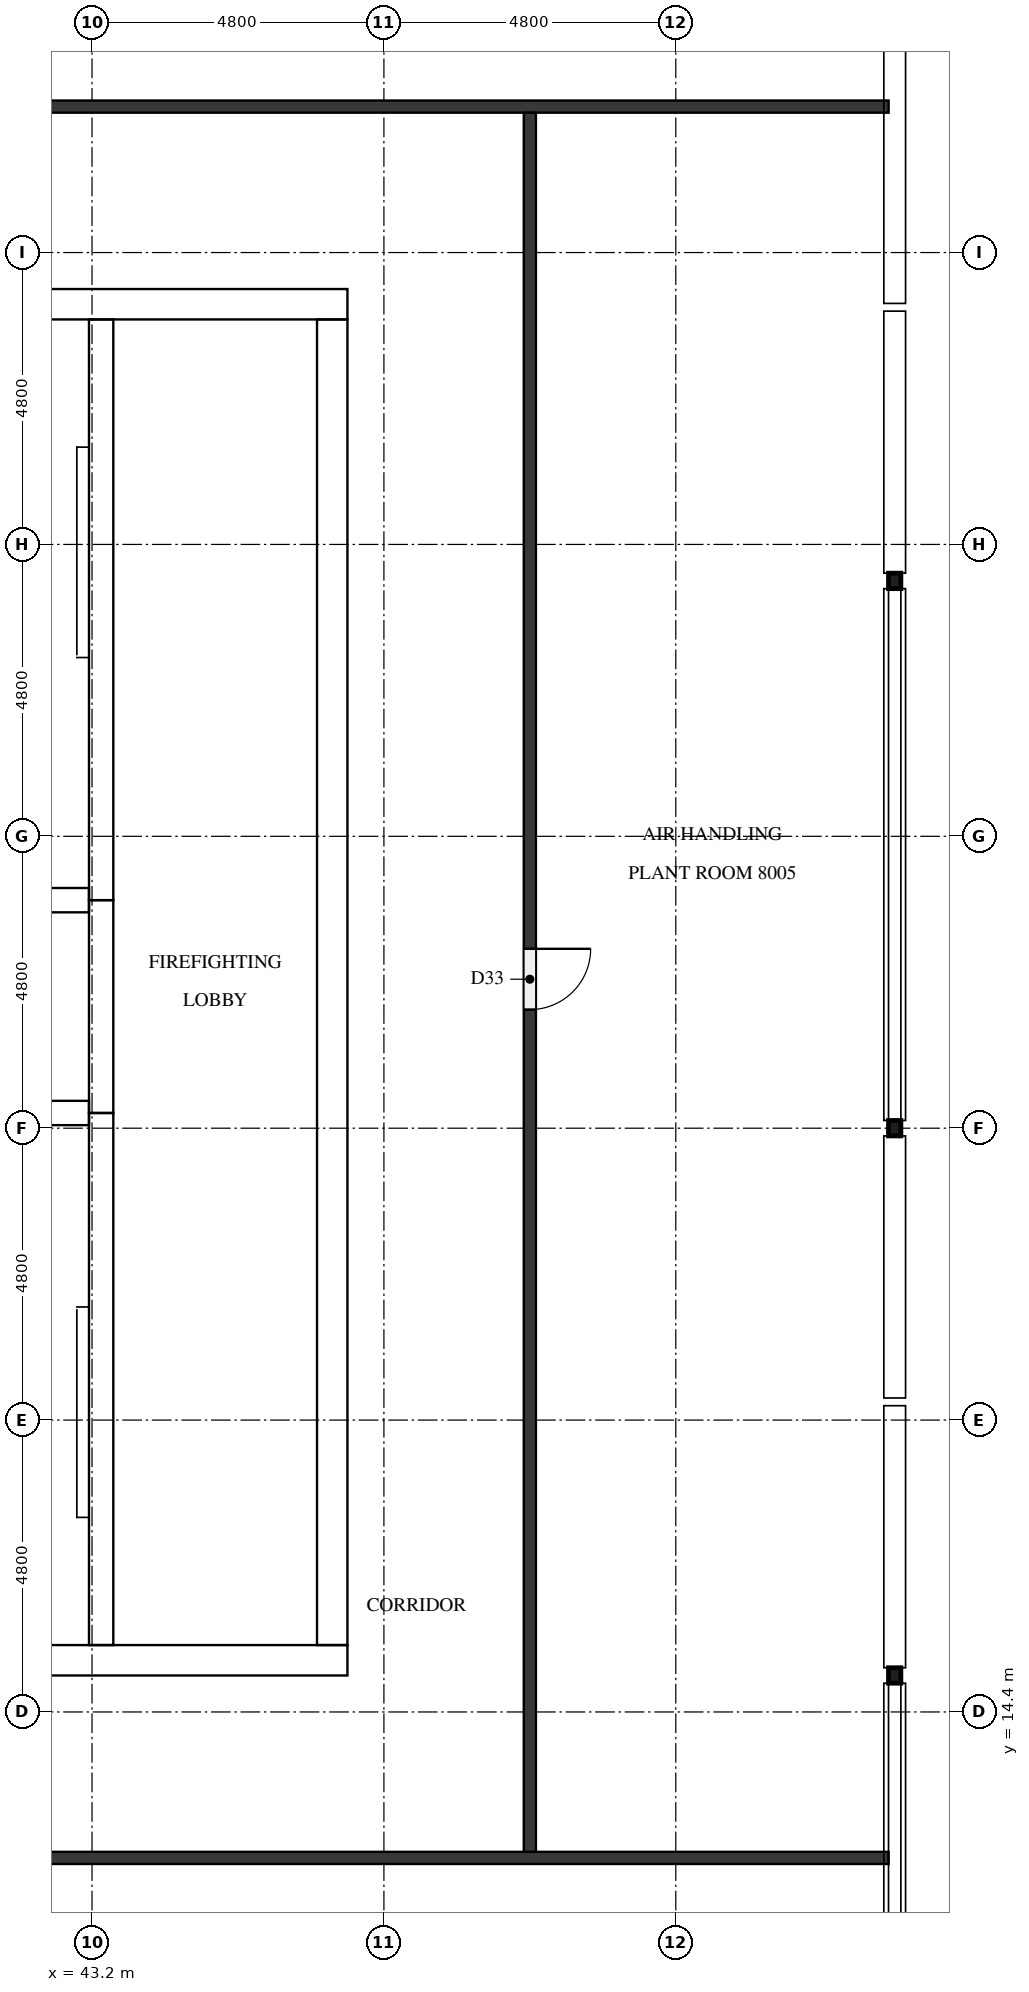
"""IFC4 building model, lengths in metres.
Left out: names, types, materials, properties, quantities, classifications, styles, units other than length and angle.
Written with IfcOpenShell. Run it as: python <this file> out.ifc"""

import sys

from ifc_helpers import new_model, si_unit, direction, frame, frame_2d, origin, origin_2d, place, context, subcontext, project, spatial, rectangle, hollow_rectangle, extrude, element, fill, save


model = new_model("IFC4")
c1 = context("Model", 3, precision=1e-05, world=origin(), true_north=direction((0.0, 1.0)))
c2 = subcontext(c1, "Body", "Model", "MODEL_VIEW")
j1 = project(units=[si_unit("LENGTHUNIT", "METRE"), si_unit("PLANEANGLEUNIT", "RADIAN")], contexts=[c1])
p1 = place(None, origin())
s1 = spatial("IfcSite", under=j1, at=p1, CompositionType="ELEMENT")
p2 = place(p1, origin())
s2 = spatial("IfcBuilding", under=s1, at=p2, CompositionType="ELEMENT")
p3 = place(p2, frame((0.0, 0.0, 310.1)))
s3 = spatial("IfcBuildingStorey", under=s2, at=p3, CompositionType="ELEMENT", Elevation=310.1)
p4 = place(p3, frame((15.0, 15.25, 0.0), z_axis=(0.0, 0.0, 1.0), x_axis=(1.0, 0.0, 0.0)))
e1 = element("IfcWall", 1, at=p4, inside=s3, PredefinedType="SHEAR", context=c2, shape_type="SweptSolid", body=[
    extrude(rectangle(XDim=32.4, YDim=0.5, at=frame_2d((16.2, 0.0))), origin(), (0.0, 0.0, 1.0), 3.8),
])
p5 = place(p4, frame((15.3, 0.0, 0.0)))
e2 = element("IfcOpeningElement", 2, at=p5, cuts=e1, PredefinedType="OPENING", context=c2, shape_type="SweptSolid", body=[
    extrude(rectangle(XDim=1.8, YDim=2.1, at=frame_2d((0.9, 1.05))), frame((0.0, 0.26, 0.0), z_axis=(0.0, -1.0, 0.0), x_axis=(1.0, 0.0, 0.0)), (0.0, 0.0, 1.0), 0.52),
])
p6 = place(p3, frame((15.0, 37.55, 0.0), z_axis=(0.0, 0.0, 1.0), x_axis=(1.0, 0.0, 0.0)))
e3 = element("IfcWall", 3, at=p6, inside=s3, PredefinedType="SHEAR", context=c2, shape_type="SweptSolid", body=[
    extrude(rectangle(XDim=32.4, YDim=0.5, at=frame_2d((16.2, 0.0))), origin(), (0.0, 0.0, 1.0), 3.8),
])
p7 = place(p6, frame((15.3, 0.0, 0.0)))
e4 = element("IfcOpeningElement", 4, at=p7, cuts=e3, PredefinedType="OPENING", context=c2, shape_type="SweptSolid", body=[
    extrude(rectangle(XDim=1.8, YDim=2.1, at=frame_2d((0.9, 1.05))), frame((0.0, 0.26, 0.0), z_axis=(0.0, -1.0, 0.0), x_axis=(1.0, 0.0, 0.0)), (0.0, 0.0, 1.0), 0.52),
])
p8 = place(p6, frame((1.282, 0.0, 0.0)))
e5 = element("IfcOpeningElement", 5, at=p8, cuts=e3, PredefinedType="OPENING", context=c2, shape_type="SweptSolid", body=[
    extrude(rectangle(XDim=1.0, YDim=2.1, at=frame_2d((0.5, 1.05))), frame((0.0, 0.26, 0.0), z_axis=(0.0, -1.0, 0.0), x_axis=(1.0, 0.0, 0.0)), (0.0, 0.0, 1.0), 0.52),
])
p9 = place(p6, frame((5.082, 0.0, 0.0)))
e6 = element("IfcOpeningElement", 6, at=p9, cuts=e3, PredefinedType="OPENING", context=c2, shape_type="SweptSolid", body=[
    extrude(rectangle(XDim=1.0, YDim=2.1, at=frame_2d((0.5, 1.05))), frame((0.0, 0.26, 0.0), z_axis=(0.0, -1.0, 0.0), x_axis=(1.0, 0.0, 0.0)), (0.0, 0.0, 1.0), 0.52),
])
p10 = place(p3, frame((47.15, 15.5, 0.0), z_axis=(0.0, 0.0, 1.0), x_axis=(0.0, 1.0, 0.0)))
e7 = element("IfcWall", 7, at=p10, inside=s3, PredefinedType="SHEAR", context=c2, shape_type="SweptSolid", body=[
    extrude(rectangle(XDim=21.8, YDim=0.5, at=frame_2d((10.9, 0.0))), origin(), (0.0, 0.0, 1.0), 3.8),
])
p11 = place(p10, frame((10.6, 0.0, 0.0)))
e8 = element("IfcOpeningElement", 8, at=p11, cuts=e7, PredefinedType="OPENING", context=c2, shape_type="SweptSolid", body=[
    extrude(rectangle(XDim=1.2, YDim=2.1, at=frame_2d((0.6, 1.05))), frame((0.0, 0.26, 0.0), z_axis=(0.0, -1.0, 0.0), x_axis=(1.0, 0.0, 0.0)), (0.0, 0.0, 1.0), 0.52),
])
p12 = place(p3, frame((43.35, 15.5, 0.0), z_axis=(0.0, 0.0, 1.0), x_axis=(0.0, 1.0, 0.0)))
e9 = element("IfcWall", 9, at=p12, inside=s3, PredefinedType="SHEAR", context=c2, shape_type="SweptSolid", body=[
    extrude(rectangle(XDim=8.75, YDim=0.4, at=frame_2d((4.375, 0.0))), origin(), (0.0, 0.0, 1.0), 3.8),
])
p13 = place(p12, frame((0.7, 0.0, 0.0)))
e10 = element("IfcOpeningElement", 10, at=p13, cuts=e9, PredefinedType="OPENING", context=c2, shape_type="SweptSolid", body=[
    extrude(rectangle(XDim=1.2, YDim=2.1, at=frame_2d((0.6, 1.05))), frame((0.0, 0.21, 0.0), z_axis=(0.0, -1.0, 0.0), x_axis=(1.0, 0.0, 0.0)), (0.0, 0.0, 1.0), 0.42),
])
p14 = place(p3, frame((43.35, 24.25, 0.0), z_axis=(0.0, 0.0, 1.0), x_axis=(0.0, 1.0, 0.0)))
e11 = element("IfcWall", 11, at=p14, inside=s3, PredefinedType="SHEAR", context=c2, shape_type="SweptSolid", body=[
    extrude(rectangle(XDim=3.5, YDim=0.4, at=frame_2d((1.75, 0.0))), origin(), (0.0, 0.0, 1.0), 3.8),
])
p15 = place(p14, frame((1.2, 0.0, 0.0)))
e12 = element("IfcOpeningElement", 12, at=p15, cuts=e11, PredefinedType="OPENING", context=c2, shape_type="SweptSolid", body=[
    extrude(rectangle(XDim=1.1, YDim=2.1, at=frame_2d((0.55, 1.05))), frame((0.0, 0.21, 0.0), z_axis=(0.0, -1.0, 0.0), x_axis=(1.0, 0.0, 0.0)), (0.0, 0.0, 1.0), 0.42),
])
p16 = place(p3, frame((43.35, 27.75, 0.0), z_axis=(0.0, 0.0, 1.0), x_axis=(0.0, 1.0, 0.0)))
e13 = element("IfcWall", 13, at=p16, inside=s3, PredefinedType="SHEAR", context=c2, shape_type="SweptSolid", body=[
    extrude(rectangle(XDim=9.55, YDim=0.4, at=frame_2d((4.775, 0.0))), origin(), (0.0, 0.0, 1.0), 3.8),
])
p17 = place(p16, frame((7.65, 0.0, 0.0)))
e14 = element("IfcOpeningElement", 14, at=p17, cuts=e13, PredefinedType="OPENING", context=c2, shape_type="SweptSolid", body=[
    extrude(rectangle(XDim=1.2, YDim=2.1, at=frame_2d((0.6, 1.05))), frame((0.0, 0.21, 0.0), z_axis=(0.0, -1.0, 0.0), x_axis=(1.0, 0.0, 0.0)), (0.0, 0.0, 1.0), 0.42),
])
for number, where, z_axis, x_axis in (
    (15, (39.5, 24.25, 0.0), (0.0, 0.0, 1.0), (1.0, 0.0, 0.0)),
    (16, (39.5, 27.75, 0.0), (0.0, 0.0, 1.0), (1.0, 0.0, 0.0)),
):
    element("IfcWall", number, at=place(p3, frame(where, z_axis=z_axis, x_axis=x_axis)), inside=s3, PredefinedType="SHEAR", context=c2, shape_type="SweptSolid", body=[
        extrude(rectangle(XDim=3.65, YDim=0.4, at=frame_2d((1.825, 0.0))), origin(), (0.0, 0.0, 1.0), 3.8),
    ])
for number, where, z_axis, x_axis in (
    (17, (56.4, 15.0, 0.0), (0.0, 0.0, 1.0), (1.0, 0.0, 0.0)),
    (18, (56.4, 24.0, 0.0), (0.0, 0.0, 1.0), (1.0, 0.0, 0.0)),
    (19, (56.4, 33.0, 0.0), (0.0, 0.0, 1.0), (1.0, 0.0, 0.0)),
):
    element("IfcColumn", number, at=place(p3, frame(where, z_axis=z_axis, x_axis=x_axis)), inside=s3, PredefinedType="COLUMN", context=c2, shape_type="SweptSolid", body=[
        extrude(hollow_rectangle(XDim=0.203, YDim=0.254, WallThickness=0.01, InnerFilletRadius=0.004, OuterFilletRadius=0.013, at=origin_2d()), origin(), (0.0, 0.0, 1.0), 3.8),
    ])
p18 = place(p3, frame((56.3, 12.0, 0.0), z_axis=(0.0, 0.0, 1.0), x_axis=(-1.0, 0.0, 0.0)))
e20 = element("IfcWall", 20, at=p18, inside=s3, PredefinedType="PARTITIONING", context=c2, shape_type="SweptSolid", body=[
    extrude(rectangle(XDim=55.0, YDim=0.2, at=frame_2d((27.5, 0.0))), origin(), (0.0, 0.0, 1.0), 3.8),
])
p19 = place(p18, frame((35.35, 0.0, 0.0)))
e21 = element("IfcOpeningElement", 21, at=p19, cuts=e20, PredefinedType="OPENING", context=c2, shape_type="SweptSolid", body=[
    extrude(rectangle(XDim=1.0, YDim=2.1, at=frame_2d((0.5, 1.05))), frame((0.0, 0.11, 0.0), z_axis=(0.0, -1.0, 0.0), x_axis=(1.0, 0.0, 0.0)), (0.0, 0.0, 1.0), 0.22),
])
p20 = place(p18, frame((16.15, 0.0, 0.0)))
e22 = element("IfcOpeningElement", 22, at=p20, cuts=e20, PredefinedType="OPENING", context=c2, shape_type="SweptSolid", body=[
    extrude(rectangle(XDim=1.0, YDim=2.1, at=frame_2d((0.5, 1.05))), frame((0.0, 0.11, 0.0), z_axis=(0.0, -1.0, 0.0), x_axis=(1.0, 0.0, 0.0)), (0.0, 0.0, 1.0), 0.22),
])
p21 = place(p3, frame((1.3, 40.8, 0.0), z_axis=(0.0, 0.0, 1.0), x_axis=(1.0, 0.0, 0.0)))
e23 = element("IfcWall", 23, at=p21, inside=s3, PredefinedType="PARTITIONING", context=c2, shape_type="SweptSolid", body=[
    extrude(rectangle(XDim=55.0, YDim=0.2, at=frame_2d((27.5, 0.0))), origin(), (0.0, 0.0, 1.0), 3.8),
])
p22 = place(p21, frame((29.35, 0.0, 0.0)))
e24 = element("IfcOpeningElement", 24, at=p22, cuts=e23, PredefinedType="OPENING", context=c2, shape_type="SweptSolid", body=[
    extrude(rectangle(XDim=1.0, YDim=2.1, at=frame_2d((0.5, 1.05))), frame((0.0, 0.11, 0.0), z_axis=(0.0, -1.0, 0.0), x_axis=(1.0, 0.0, 0.0)), (0.0, 0.0, 1.0), 0.22),
])
p23 = place(p3, frame((50.4, 40.7, 0.0), z_axis=(0.0, 0.0, 1.0), x_axis=(0.0, -1.0, 0.0)))
e25 = element("IfcWall", 25, at=p23, inside=s3, PredefinedType="PARTITIONING", context=c2, shape_type="SweptSolid", body=[
    extrude(rectangle(XDim=28.6, YDim=0.2, at=frame_2d((14.3, 0.0))), origin(), (0.0, 0.0, 1.0), 3.8),
])
p24 = place(p23, frame((13.75, 0.0, 0.0)))
e26 = element("IfcOpeningElement", 26, at=p24, cuts=e25, PredefinedType="OPENING", context=c2, shape_type="SweptSolid", body=[
    extrude(rectangle(XDim=1.0, YDim=2.1, at=frame_2d((0.5, 1.05))), frame((0.0, 0.11, 0.0), z_axis=(0.0, -1.0, 0.0), x_axis=(1.0, 0.0, 0.0)), (0.0, 0.0, 1.0), 0.22),
])
p25 = place(p15, origin())
e27 = element("IfcDoor", 27, at=p25, inside=s3, OperationType="DOUBLE_DOOR_SLIDING", PredefinedType="DOOR", context=c2, shape_type="SweptSolid", body=[
    extrude(rectangle(XDim=1.1, YDim=2.1, at=frame_2d((0.55, 1.05))), frame((0.0, 0.025, 0.0), z_axis=(0.0, -1.0, 0.0), x_axis=(1.0, 0.0, 0.0)), (0.0, 0.0, 1.0), 0.05),
])
fill(e12, e27)
p26 = place(p13, origin())
e28 = element("IfcDoor", 28, at=p26, inside=s3, OperationType="SINGLE_SWING_LEFT", PredefinedType="DOOR", context=c2, shape_type="SweptSolid", body=[
    extrude(rectangle(XDim=1.2, YDim=2.1, at=frame_2d((0.6, 1.05))), frame((0.0, 0.025, 0.0), z_axis=(0.0, -1.0, 0.0), x_axis=(1.0, 0.0, 0.0)), (0.0, 0.0, 1.0), 0.05),
])
fill(e10, e28)
p27 = place(p17, origin())
e29 = element("IfcDoor", 29, at=p27, inside=s3, OperationType="SINGLE_SWING_RIGHT", PredefinedType="DOOR", context=c2, shape_type="SweptSolid", body=[
    extrude(rectangle(XDim=1.2, YDim=2.1, at=frame_2d((0.6, 1.05))), frame((0.0, 0.025, 0.0), z_axis=(0.0, -1.0, 0.0), x_axis=(1.0, 0.0, 0.0)), (0.0, 0.0, 1.0), 0.05),
])
fill(e14, e29)
p28 = place(p11, origin())
e30 = element("IfcDoor", 30, at=p28, inside=s3, OperationType="SINGLE_SWING_RIGHT", PredefinedType="DOOR", context=c2, shape_type="SweptSolid", body=[
    extrude(rectangle(XDim=1.2, YDim=2.1, at=frame_2d((0.6, 1.05))), frame((0.0, 0.025, 0.0), z_axis=(0.0, -1.0, 0.0), x_axis=(1.0, 0.0, 0.0)), (0.0, 0.0, 1.0), 0.05),
])
fill(e8, e30)
p29 = place(p24, origin())
e31 = element("IfcDoor", 31, at=p29, inside=s3, OperationType="SINGLE_SWING_LEFT", PredefinedType="DOOR", context=c2, shape_type="SweptSolid", body=[
    extrude(rectangle(XDim=1.0, YDim=2.1, at=frame_2d((0.5, 1.05))), frame((0.0, 0.025, 0.0), z_axis=(0.0, -1.0, 0.0), x_axis=(1.0, 0.0, 0.0)), (0.0, 0.0, 1.0), 0.05),
])
fill(e26, e31)
save(model, sys.argv[1])
